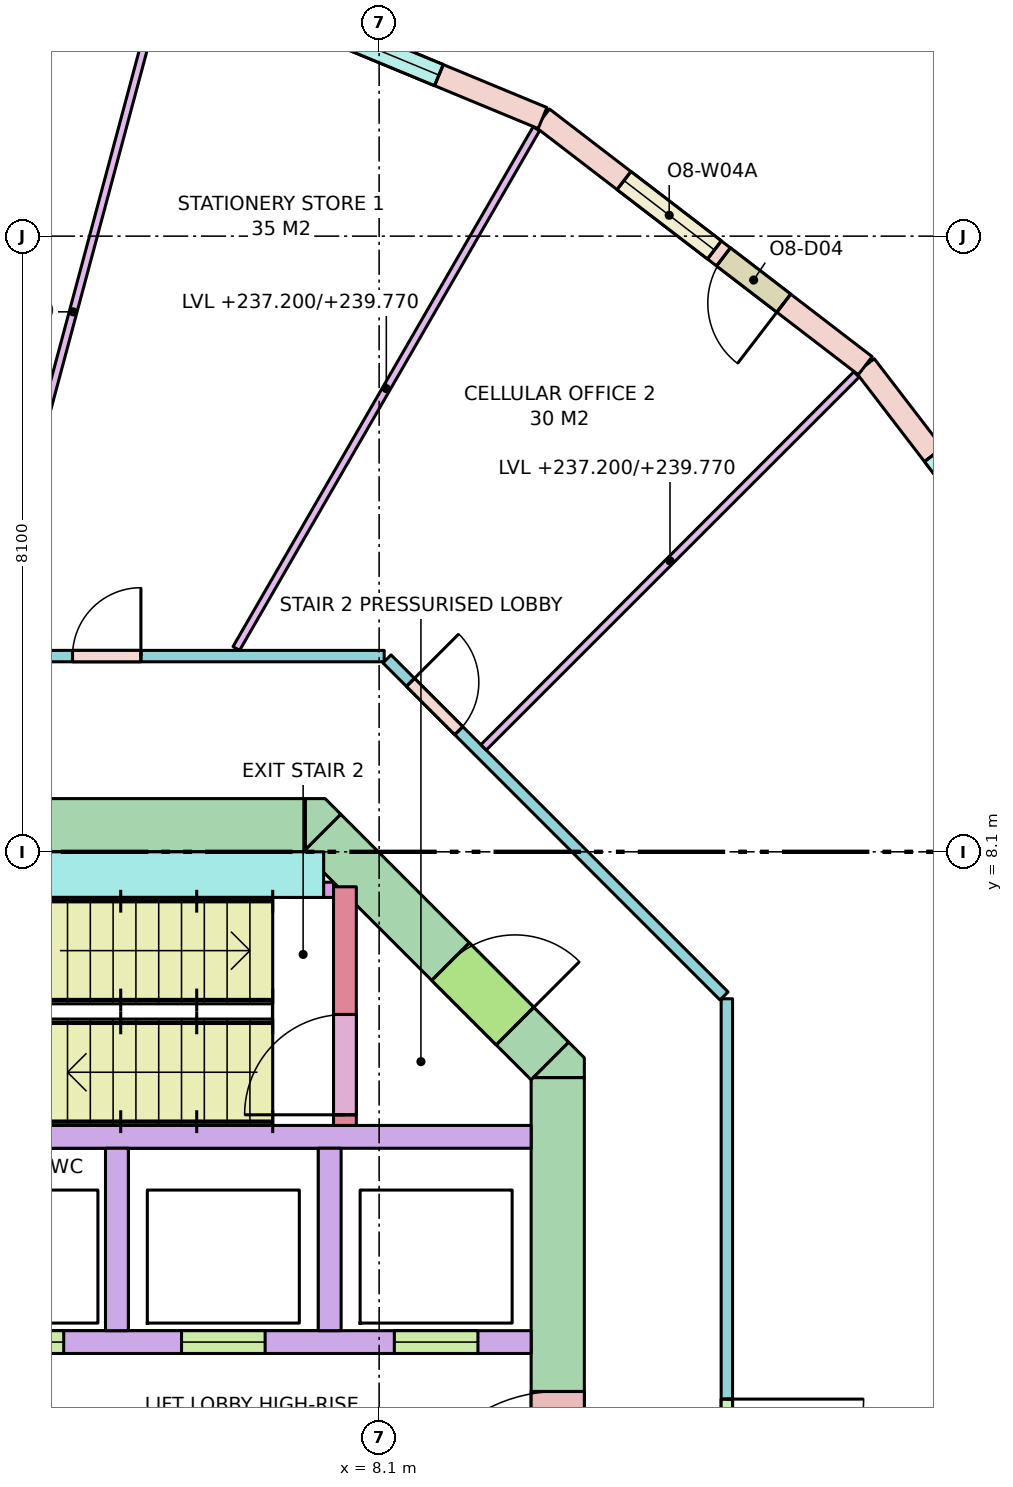
"""IFC4 building model, lengths in metres.
Left out: names, types, materials, properties, quantities, classifications, styles, units other than length and angle.
Written with IfcOpenShell. Run it as: python <this file> out.ifc"""

import sys

from ifc_helpers import new_model, si_unit, direction, frame, frame_2d, origin, place, context, subcontext, project, spatial, polyline, rectangle, outline, extrude, element, fill, save


model = new_model("IFC4")
c1 = context("Model", 3, precision=1e-05, world=origin(), true_north=direction((0.0, 1.0)))
c2 = subcontext(c1, "Body", "Model", "MODEL_VIEW")
j1 = project(units=[si_unit("LENGTHUNIT", "METRE"), si_unit("PLANEANGLEUNIT", "RADIAN")], contexts=[c1])
p1 = place(None, origin())
s1 = spatial("IfcSite", under=j1, at=p1, CompositionType="ELEMENT")
p2 = place(p1, origin())
s2 = spatial("IfcBuilding", under=s1, at=p2, CompositionType="ELEMENT")
p3 = place(p2, frame((0.0, 0.0, 237.2)))
s3 = spatial("IfcBuildingStorey", under=s2, at=p3, CompositionType="ELEMENT", Elevation=237.2)
p4 = place(p3, frame((-7.13, 8.45, -0.28), z_axis=(0.0, 0.0, 1.0), x_axis=(1.0, 0.0, 0.0)))
e1 = element("IfcWall", 1, at=p4, inside=s3, PredefinedType="SHEAR", context=c2, shape_type="SweptSolid", body=[
    extrude(rectangle(XDim=14.26, YDim=0.7, at=frame_2d((7.13, 0.0))), origin(), (0.0, 0.0, 1.0), 3.7),
])
p5 = place(p4, frame((5.48, 0.0, 0.28)))
e2 = element("IfcOpeningElement", 2, at=p5, cuts=e1, PredefinedType="OPENING", context=c2, shape_type="SweptSolid", body=[
    extrude(rectangle(XDim=0.7, YDim=2.1, at=frame_2d((0.35, 1.05))), frame((0.0, 0.36, 0.0), z_axis=(0.0, -1.0, 0.0), x_axis=(1.0, 0.0, 0.0)), (0.0, 0.0, 1.0), 0.72),
])
p6 = place(p4, frame((7.155, 0.0, 0.28)))
e3 = element("IfcOpeningElement", 3, at=p6, cuts=e1, PredefinedType="OPENING", context=c2, shape_type="SweptSolid", body=[
    extrude(rectangle(XDim=0.9, YDim=2.1, at=frame_2d((0.45, 1.05))), frame((0.0, 0.36, 0.0), z_axis=(0.0, -1.0, 0.0), x_axis=(1.0, 0.0, 0.0)), (0.0, 0.0, 1.0), 0.72),
])
p7 = place(p3, frame((10.45, -5.13, -0.28), z_axis=(0.0, 0.0, 1.0), x_axis=(0.0, 1.0, 0.0)))
e4 = element("IfcWall", 4, at=p7, inside=s3, PredefinedType="SHEAR", context=c2, shape_type="SweptSolid", body=[
    extrude(rectangle(XDim=10.26, YDim=0.7, at=frame_2d((5.13, 0.0))), origin(), (0.0, 0.0, 1.0), 3.7),
])
p8 = place(p7, frame((4.13, 0.0, 0.28)))
e5 = element("IfcOpeningElement", 5, at=p8, cuts=e4, PredefinedType="OPENING", context=c2, shape_type="SweptSolid", body=[
    extrude(rectangle(XDim=2.0, YDim=2.1, at=frame_2d((1.0, 1.05))), frame((0.0, 0.36, 0.0), z_axis=(0.0, -1.0, 0.0), x_axis=(1.0, 0.0, 0.0)), (0.0, 0.0, 1.0), 0.72),
])
p9 = place(p3, frame((7.347, 8.347, -0.28), z_axis=(0.0, 0.0, 1.0), x_axis=(0.707106781187, -0.707106781187, 0.0)))
e6 = element("IfcWall", 6, at=p9, inside=s3, PredefinedType="SHEAR", context=c2, shape_type="SweptSolid", body=[
    extrude(rectangle(XDim=4.243, YDim=0.7, at=frame_2d((2.121, 0.0))), origin(), (0.0, 0.0, 1.0), 3.7),
])
p10 = place(p9, frame((2.393, 0.0, 0.28)))
e7 = element("IfcOpeningElement", 7, at=p10, cuts=e6, PredefinedType="OPENING", context=c2, shape_type="SweptSolid", body=[
    extrude(rectangle(XDim=1.2, YDim=2.1, at=frame_2d((0.6, 1.05))), frame((0.0, 0.36, 0.0), z_axis=(0.0, -1.0, 0.0), x_axis=(1.0, 0.0, 0.0)), (0.0, 0.0, 1.0), 0.72),
])
p11 = place(p3, frame((0.0, 0.0, -0.28)))
e8 = element("IfcWall", 8, at=p11, inside=s3, PredefinedType="SHEAR", context=c2, shape_type="SweptSolid", body=[
    extrude(outline(polyline([(10.8, 5.39), (10.8, 5.13), (10.8, 5.13), (10.13, 5.13), (10.595, 5.595), (10.595, 5.595), (10.595, 5.595), (10.8, 5.39)])), origin(), (0.0, 0.0, 1.0), 3.7),
])
p12 = place(p3, frame((0.0, 0.0, -0.28)))
e9 = element("IfcWall", 9, at=p12, inside=s3, PredefinedType="SHEAR", context=c2, shape_type="SweptSolid", body=[
    extrude(outline(polyline([(7.39, 8.8), (7.595, 8.595), (7.595, 8.595), (7.595, 8.595), (7.13, 8.13), (7.13, 8.8), (7.13, 8.8), (7.39, 8.8)])), origin(), (0.0, 0.0, 1.0), 3.7),
])
p13 = place(p3, frame((2.0, 4.35, 0.0), z_axis=(0.0, 0.0, 1.0), x_axis=(1.0, 0.0, 0.0)))
e10 = element("IfcWall", 10, at=p13, inside=s3, PredefinedType="SOLIDWALL", context=c2, shape_type="SweptSolid", body=[
    extrude(rectangle(XDim=8.1, YDim=0.3, at=frame_2d((4.05, 0.0))), origin(), (0.0, 0.0, 1.0), 3.42),
])
p14 = place(p3, frame((2.0, 1.65, 0.0), z_axis=(0.0, 0.0, 1.0), x_axis=(1.0, 0.0, 0.0)))
e11 = element("IfcWall", 11, at=p14, inside=s3, PredefinedType="SOLIDWALL", context=c2, shape_type="SweptSolid", body=[
    extrude(rectangle(XDim=8.1, YDim=0.3, at=frame_2d((4.05, 0.0))), origin(), (0.0, 0.0, 1.0), 3.42),
])
p15 = place(p14, frame((0.85, 0.0, 0.0)))
e12 = element("IfcOpeningElement", 12, at=p15, cuts=e11, PredefinedType="OPENING", context=c2, shape_type="SweptSolid", body=[
    extrude(rectangle(XDim=1.1, YDim=2.1, at=frame_2d((0.55, 1.05))), frame((0.0, 0.16, 0.0), z_axis=(0.0, -1.0, 0.0), x_axis=(1.0, 0.0, 0.0)), (0.0, 0.0, 1.0), 0.32),
])
p16 = place(p14, frame((3.5, 0.0, 0.0)))
e13 = element("IfcOpeningElement", 13, at=p16, cuts=e11, PredefinedType="OPENING", context=c2, shape_type="SweptSolid", body=[
    extrude(rectangle(XDim=1.1, YDim=2.1, at=frame_2d((0.55, 1.05))), frame((0.0, 0.16, 0.0), z_axis=(0.0, -1.0, 0.0), x_axis=(1.0, 0.0, 0.0)), (0.0, 0.0, 1.0), 0.32),
])
p17 = place(p14, frame((6.3, 0.0, 0.0)))
e14 = element("IfcOpeningElement", 14, at=p17, cuts=e11, PredefinedType="OPENING", context=c2, shape_type="SweptSolid", body=[
    extrude(rectangle(XDim=1.1, YDim=2.1, at=frame_2d((0.55, 1.05))), frame((0.0, 0.16, 0.0), z_axis=(0.0, -1.0, 0.0), x_axis=(1.0, 0.0, 0.0)), (0.0, 0.0, 1.0), 0.32),
])
for number, where, z_axis, x_axis in (
    (15, (4.65, 1.8, 0.0), (0.0, 0.0, 1.0), (0.0, 1.0, 0.0)),
    (16, (7.45, 1.8, 0.0), (0.0, 0.0, 1.0), (0.0, 1.0, 0.0)),
):
    element("IfcWall", number, at=place(p3, frame(where, z_axis=z_axis, x_axis=x_axis)), inside=s3, PredefinedType="SOLIDWALL", context=c2, shape_type="SweptSolid", body=[
        extrude(rectangle(XDim=2.4, YDim=0.3, at=frame_2d((1.2, 0.0))), origin(), (0.0, 0.0, 1.0), 3.42),
    ])
p18 = place(p3, frame((7.65, 4.5, 0.0), z_axis=(0.0, 0.0, 1.0), x_axis=(0.0, 1.0, 0.0)))
e17 = element("IfcWall", 17, at=p18, inside=s3, PredefinedType="SHEAR", context=c2, shape_type="SweptSolid", body=[
    extrude(rectangle(XDim=3.14, YDim=0.3, at=frame_2d((1.57, 0.0))), origin(), (0.0, 0.0, 1.0), 3.42),
])
p19 = place(p18, frame((0.14, 0.0, 0.0)))
e18 = element("IfcOpeningElement", 18, at=p19, cuts=e17, PredefinedType="OPENING", context=c2, shape_type="SweptSolid", body=[
    extrude(rectangle(XDim=1.32, YDim=2.1, at=frame_2d((0.66, 1.05))), frame((0.0, 0.16, 0.0), z_axis=(0.0, -1.0, 0.0), x_axis=(1.0, 0.0, 0.0)), (0.0, 0.0, 1.0), 0.32),
])
p20 = place(p3, frame((2.0, 7.8, 0.0), z_axis=(0.0, 0.0, 1.0), x_axis=(1.0, 0.0, 0.0)))
e19 = element("IfcWall", 19, at=p20, inside=s3, PredefinedType="SHEAR", context=c2, shape_type="SweptSolid", body=[
    extrude(rectangle(XDim=5.37, YDim=0.6, at=frame_2d((2.685, 0.0))), origin(), (0.0, 0.0, 1.0), 3.42),
])
p21 = place(p3, frame((6.9, 7.6, 0.0), z_axis=(0.0, 0.0, 1.0), x_axis=(1.0, 0.0, 0.0)))
e20 = element("IfcWall", 20, at=p21, inside=s3, PredefinedType="SHEAR", context=c2, shape_type="SweptSolid", body=[
    extrude(rectangle(XDim=0.6, YDim=0.2, at=frame_2d((0.3, 0.0))), origin(), (0.0, 0.0, 1.0), 3.42),
])
p22 = place(p3, frame((17.753, 10.25, 0.0), z_axis=(0.0, 0.0, 1.0), x_axis=(-0.60876670321, 0.793349293227, 0.0)))
e21 = element("IfcWall", 21, at=p22, inside=s3, PredefinedType="STANDARD", context=c2, shape_type="SweptSolid", body=[
    extrude(rectangle(XDim=5.352, YDim=0.3, at=frame_2d((2.676, 0.0))), origin(), (0.0, 0.0, 1.0), 3.42),
])
p23 = place(p22, frame((1.476, 0.0, 0.8)))
e22 = element("IfcOpeningElement", 22, at=p23, cuts=e21, PredefinedType="OPENING", context=c2, shape_type="SweptSolid", body=[
    extrude(rectangle(XDim=2.4, YDim=2.4, at=frame_2d((1.2, 1.2))), frame((0.0, 0.16, 0.0), z_axis=(0.0, -1.0, 0.0), x_axis=(1.0, 0.0, 0.0)), (0.0, 0.0, 1.0), 0.32),
])
p24 = place(p3, frame((14.496, 14.496, 0.0), z_axis=(0.0, 0.0, 1.0), x_axis=(-0.793349293227, 0.60876670321, 0.0)))
e23 = element("IfcWall", 23, at=p24, inside=s3, PredefinedType="STANDARD", context=c2, shape_type="SweptSolid", body=[
    extrude(rectangle(XDim=5.352, YDim=0.3, at=frame_2d((2.676, 0.0))), origin(), (0.0, 0.0, 1.0), 3.42),
])
p25 = place(p24, frame((1.351, 0.0, 0.0)))
e24 = element("IfcOpeningElement", 24, at=p25, cuts=e23, PredefinedType="OPENING", context=c2, shape_type="SweptSolid", body=[
    extrude(rectangle(XDim=1.0, YDim=2.4, at=frame_2d((0.5, 1.2))), frame((0.0, 0.16, 0.0), z_axis=(0.0, -1.0, 0.0), x_axis=(1.0, 0.0, 0.0)), (0.0, 0.0, 1.0), 0.32),
])
p26 = place(p24, frame((2.501, 0.0, 0.8)))
e25 = element("IfcOpeningElement", 25, at=p26, cuts=e23, PredefinedType="OPENING", context=c2, shape_type="SweptSolid", body=[
    extrude(rectangle(XDim=1.5, YDim=2.4, at=frame_2d((0.75, 1.2))), frame((0.0, 0.16, 0.0), z_axis=(0.0, -1.0, 0.0), x_axis=(1.0, 0.0, 0.0)), (0.0, 0.0, 1.0), 0.32),
])
p27 = place(p3, frame((10.25, 17.753, 0.0), z_axis=(0.0, 0.0, 1.0), x_axis=(-0.923867255172, 0.382713071139, 0.0)))
e26 = element("IfcWall", 26, at=p27, inside=s3, PredefinedType="STANDARD", context=c2, shape_type="SweptSolid", body=[
    extrude(rectangle(XDim=5.352, YDim=0.3, at=frame_2d((2.676, 0.0))), origin(), (0.0, 0.0, 1.0), 3.42),
])
p28 = place(p27, frame((1.476, 0.0, 0.8)))
e27 = element("IfcOpeningElement", 27, at=p28, cuts=e26, PredefinedType="OPENING", context=c2, shape_type="SweptSolid", body=[
    extrude(rectangle(XDim=2.4, YDim=2.4, at=frame_2d((1.2, 1.2))), frame((0.0, 0.16, 0.0), z_axis=(0.0, -1.0, 0.0), x_axis=(1.0, 0.0, 0.0)), (0.0, 0.0, 1.0), 0.32),
])
p29 = place(p3, frame((-8.167, 10.675, 0.0), z_axis=(0.0, 0.0, 1.0), x_axis=(1.0, 0.0, 0.0)))
e28 = element("IfcWall", 28, at=p29, inside=s3, PredefinedType="PARTITIONING", context=c2, shape_type="SweptSolid", body=[
    extrude(rectangle(XDim=16.333, YDim=0.15, at=frame_2d((8.167, 0.0))), origin(), (0.0, 0.0, 1.0), 2.57),
])
p30 = place(p29, frame((12.232, 0.0, 0.0)))
e29 = element("IfcOpeningElement", 29, at=p30, cuts=e28, PredefinedType="OPENING", context=c2, shape_type="SweptSolid", body=[
    extrude(rectangle(XDim=0.9, YDim=2.1, at=frame_2d((0.45, 1.05))), frame((0.0, 0.085, 0.0), z_axis=(0.0, -1.0, 0.0), x_axis=(1.0, 0.0, 0.0)), (0.0, 0.0, 1.0), 0.17),
])
p31 = place(p29, frame((7.667, 0.0, 0.0)))
e30 = element("IfcOpeningElement", 30, at=p31, cuts=e28, PredefinedType="OPENING", context=c2, shape_type="SweptSolid", body=[
    extrude(rectangle(XDim=1.0, YDim=2.1, at=frame_2d((0.5, 1.05))), frame((0.0, 0.085, 0.0), z_axis=(0.0, -1.0, 0.0), x_axis=(1.0, 0.0, 0.0)), (0.0, 0.0, 1.0), 0.17),
])
p32 = place(p29, frame((3.201, 0.0, 0.0)))
e31 = element("IfcOpeningElement", 31, at=p32, cuts=e28, PredefinedType="OPENING", context=c2, shape_type="SweptSolid", body=[
    extrude(rectangle(XDim=0.9, YDim=2.1, at=frame_2d((0.45, 1.05))), frame((0.0, 0.085, 0.0), z_axis=(0.0, -1.0, 0.0), x_axis=(1.0, 0.0, 0.0)), (0.0, 0.0, 1.0), 0.17),
])
p33 = place(p3, frame((8.204, 10.638, 0.0), z_axis=(0.0, 0.0, 1.0), x_axis=(0.707106781187, -0.707106781187, 0.0)))
e32 = element("IfcWall", 32, at=p33, inside=s3, PredefinedType="PARTITIONING", context=c2, shape_type="SweptSolid", body=[
    extrude(rectangle(XDim=6.271, YDim=0.15, at=frame_2d((3.135, 0.0))), origin(), (0.0, 0.0, 1.0), 2.57),
])
p34 = place(p33, frame((0.436, 0.0, 0.0)))
e33 = element("IfcOpeningElement", 33, at=p34, cuts=e32, PredefinedType="OPENING", context=c2, shape_type="SweptSolid", body=[
    extrude(rectangle(XDim=0.9, YDim=2.1, at=frame_2d((0.45, 1.05))), frame((0.0, 0.085, 0.0), z_axis=(0.0, -1.0, 0.0), x_axis=(1.0, 0.0, 0.0)), (0.0, 0.0, 1.0), 0.17),
])
p35 = place(p3, frame((12.675, 6.167, 0.0), z_axis=(0.0, 0.0, 1.0), x_axis=(0.0, -1.0, 0.0)))
e34 = element("IfcWall", 34, at=p35, inside=s3, PredefinedType="PARTITIONING", context=c2, shape_type="SweptSolid", body=[
    extrude(rectangle(XDim=12.333, YDim=0.15, at=frame_2d((6.167, 0.0))), origin(), (0.0, 0.0, 1.0), 2.57),
])
p36 = place(p35, frame((5.267, 0.0, 0.0)))
e35 = element("IfcOpeningElement", 35, at=p36, cuts=e34, PredefinedType="OPENING", context=c2, shape_type="SweptSolid", body=[
    extrude(rectangle(XDim=1.8, YDim=2.1, at=frame_2d((0.9, 1.05))), frame((0.0, 0.085, 0.0), z_axis=(0.0, -1.0, 0.0), x_axis=(1.0, 0.0, 0.0)), (0.0, 0.0, 1.0), 0.17),
])
p37 = place(p3, frame((9.474, 9.474, 0.0), z_axis=(0.0, 0.0, 1.0), x_axis=(0.707106781187, 0.707106781187, 0.0)))
e36 = element("IfcWall", 36, at=p37, inside=s3, PredefinedType="PARTITIONING", context=c2, shape_type="SweptSolid", body=[
    extrude(rectangle(XDim=6.938, YDim=0.1, at=frame_2d((3.469, 0.0))), origin(), (0.0, 0.0, 1.0), 2.57),
])
p38 = place(p3, frame((6.221, 10.775, 0.0), z_axis=(0.0, 0.0, 1.0), x_axis=(0.500016891966, 0.866015650984, 0.0)))
e37 = element("IfcWall", 37, at=p38, inside=s3, PredefinedType="PARTITIONING", context=c2, shape_type="SweptSolid", body=[
    extrude(rectangle(XDim=7.895, YDim=0.1, at=frame_2d((3.948, 0.0))), origin(), (0.0, 0.0, 1.0), 2.57),
])
p39 = place(p3, frame((2.884, 10.764, 0.0), z_axis=(0.0, 0.0, 1.0), x_axis=(0.258811310764, 0.965927898666, 0.0)))
e38 = element("IfcWall", 38, at=p39, inside=s3, PredefinedType="PARTITIONING", context=c2, shape_type="SweptSolid", body=[
    extrude(rectangle(XDim=9.193, YDim=0.1, at=frame_2d((4.596, 0.0))), origin(), (0.0, 0.0, 1.0), 2.57),
])
p40 = place(p23, origin())
e39 = element("IfcWindow", 39, at=p40, inside=s3, PartitioningType="SINGLE_PANEL", PredefinedType="WINDOW", context=c2, shape_type="SweptSolid", body=[
    extrude(rectangle(XDim=2.4, YDim=2.4, at=frame_2d((1.2, 1.2))), frame((0.0, 0.03, 0.0), z_axis=(0.0, -1.0, 0.0), x_axis=(1.0, 0.0, 0.0)), (0.0, 0.0, 1.0), 0.06),
])
fill(e22, e39)
p41 = place(p25, origin())
e40 = element("IfcDoor", 40, at=p41, inside=s3, OperationType="SINGLE_SWING_LEFT", PredefinedType="DOOR", context=c2, shape_type="SweptSolid", body=[
    extrude(rectangle(XDim=1.0, YDim=2.4, at=frame_2d((0.5, 1.2))), frame((0.0, 0.025, 0.0), z_axis=(0.0, -1.0, 0.0), x_axis=(1.0, 0.0, 0.0)), (0.0, 0.0, 1.0), 0.05),
])
fill(e24, e40)
p42 = place(p26, origin())
e41 = element("IfcWindow", 41, at=p42, inside=s3, PartitioningType="SINGLE_PANEL", PredefinedType="WINDOW", context=c2, shape_type="SweptSolid", body=[
    extrude(rectangle(XDim=1.5, YDim=2.4, at=frame_2d((0.75, 1.2))), frame((0.0, 0.03, 0.0), z_axis=(0.0, -1.0, 0.0), x_axis=(1.0, 0.0, 0.0)), (0.0, 0.0, 1.0), 0.06),
])
fill(e25, e41)
p43 = place(p28, origin())
e42 = element("IfcWindow", 42, at=p43, inside=s3, PartitioningType="SINGLE_PANEL", PredefinedType="WINDOW", context=c2, shape_type="SweptSolid", body=[
    extrude(rectangle(XDim=2.4, YDim=2.4, at=frame_2d((1.2, 1.2))), frame((0.0, 0.03, 0.0), z_axis=(0.0, -1.0, 0.0), x_axis=(1.0, 0.0, 0.0)), (0.0, 0.0, 1.0), 0.06),
])
fill(e27, e42)
p44 = place(p15, origin())
e43 = element("IfcDoor", 43, at=p44, inside=s3, OperationType="DOUBLE_DOOR_SLIDING", PredefinedType="DOOR", context=c2, shape_type="SweptSolid", body=[
    extrude(rectangle(XDim=1.1, YDim=2.1, at=frame_2d((0.55, 1.05))), frame((0.0, 0.025, 0.0), z_axis=(0.0, -1.0, 0.0), x_axis=(1.0, 0.0, 0.0)), (0.0, 0.0, 1.0), 0.05),
])
fill(e12, e43)
p45 = place(p16, origin())
e44 = element("IfcDoor", 44, at=p45, inside=s3, OperationType="DOUBLE_DOOR_SLIDING", PredefinedType="DOOR", context=c2, shape_type="SweptSolid", body=[
    extrude(rectangle(XDim=1.1, YDim=2.1, at=frame_2d((0.55, 1.05))), frame((0.0, 0.025, 0.0), z_axis=(0.0, -1.0, 0.0), x_axis=(1.0, 0.0, 0.0)), (0.0, 0.0, 1.0), 0.05),
])
fill(e13, e44)
p46 = place(p17, origin())
e45 = element("IfcDoor", 45, at=p46, inside=s3, OperationType="DOUBLE_DOOR_SLIDING", PredefinedType="DOOR", context=c2, shape_type="SweptSolid", body=[
    extrude(rectangle(XDim=1.1, YDim=2.1, at=frame_2d((0.55, 1.05))), frame((0.0, 0.025, 0.0), z_axis=(0.0, -1.0, 0.0), x_axis=(1.0, 0.0, 0.0)), (0.0, 0.0, 1.0), 0.05),
])
fill(e14, e45)
p47 = place(p19, origin())
e46 = element("IfcDoor", 46, at=p47, inside=s3, OperationType="DOUBLE_DOOR_SINGLE_SWING", PredefinedType="DOOR", context=c2, shape_type="SweptSolid", body=[
    extrude(rectangle(XDim=1.32, YDim=2.1, at=frame_2d((0.66, 1.05))), frame((0.0, 0.025, 0.0), z_axis=(0.0, -1.0, 0.0), x_axis=(1.0, 0.0, 0.0)), (0.0, 0.0, 1.0), 0.05),
])
fill(e18, e46)
p48 = place(p10, origin())
e47 = element("IfcDoor", 47, at=p48, inside=s3, OperationType="SINGLE_SWING_RIGHT", PredefinedType="DOOR", context=c2, shape_type="SweptSolid", body=[
    extrude(rectangle(XDim=1.2, YDim=2.1, at=frame_2d((0.6, 1.05))), frame((0.0, 0.025, 0.0), z_axis=(0.0, -1.0, 0.0), x_axis=(1.0, 0.0, 0.0)), (0.0, 0.0, 1.0), 0.05),
])
fill(e7, e47)
p49 = place(p8, origin())
e48 = element("IfcDoor", 48, at=p49, inside=s3, OperationType="DOUBLE_DOOR_SINGLE_SWING", PredefinedType="DOOR", context=c2, shape_type="SweptSolid", body=[
    extrude(rectangle(XDim=2.0, YDim=2.1, at=frame_2d((1.0, 1.05))), frame((0.0, 0.025, 0.0), z_axis=(0.0, -1.0, 0.0), x_axis=(1.0, 0.0, 0.0)), (0.0, 0.0, 1.0), 0.05),
])
fill(e5, e48)
p50 = place(p36, origin())
e49 = element("IfcDoor", 49, at=p50, inside=s3, OperationType="DOUBLE_DOOR_SINGLE_SWING", PredefinedType="DOOR", context=c2, shape_type="SweptSolid", body=[
    extrude(rectangle(XDim=1.8, YDim=2.1, at=frame_2d((0.9, 1.05))), frame((0.0, 0.025, 0.0), z_axis=(0.0, -1.0, 0.0), x_axis=(1.0, 0.0, 0.0)), (0.0, 0.0, 1.0), 0.05),
])
fill(e35, e49)
p51 = place(p34, origin())
e50 = element("IfcDoor", 50, at=p51, inside=s3, OperationType="SINGLE_SWING_LEFT", PredefinedType="DOOR", context=c2, shape_type="SweptSolid", body=[
    extrude(rectangle(XDim=0.9, YDim=2.1, at=frame_2d((0.45, 1.05))), frame((0.0, 0.025, 0.0), z_axis=(0.0, -1.0, 0.0), x_axis=(1.0, 0.0, 0.0)), (0.0, 0.0, 1.0), 0.05),
])
fill(e33, e50)
p52 = place(p30, origin())
e51 = element("IfcDoor", 51, at=p52, inside=s3, OperationType="SINGLE_SWING_RIGHT", PredefinedType="DOOR", context=c2, shape_type="SweptSolid", body=[
    extrude(rectangle(XDim=0.9, YDim=2.1, at=frame_2d((0.45, 1.05))), frame((0.0, 0.025, 0.0), z_axis=(0.0, -1.0, 0.0), x_axis=(1.0, 0.0, 0.0)), (0.0, 0.0, 1.0), 0.05),
])
fill(e29, e51)
save(model, sys.argv[1])
